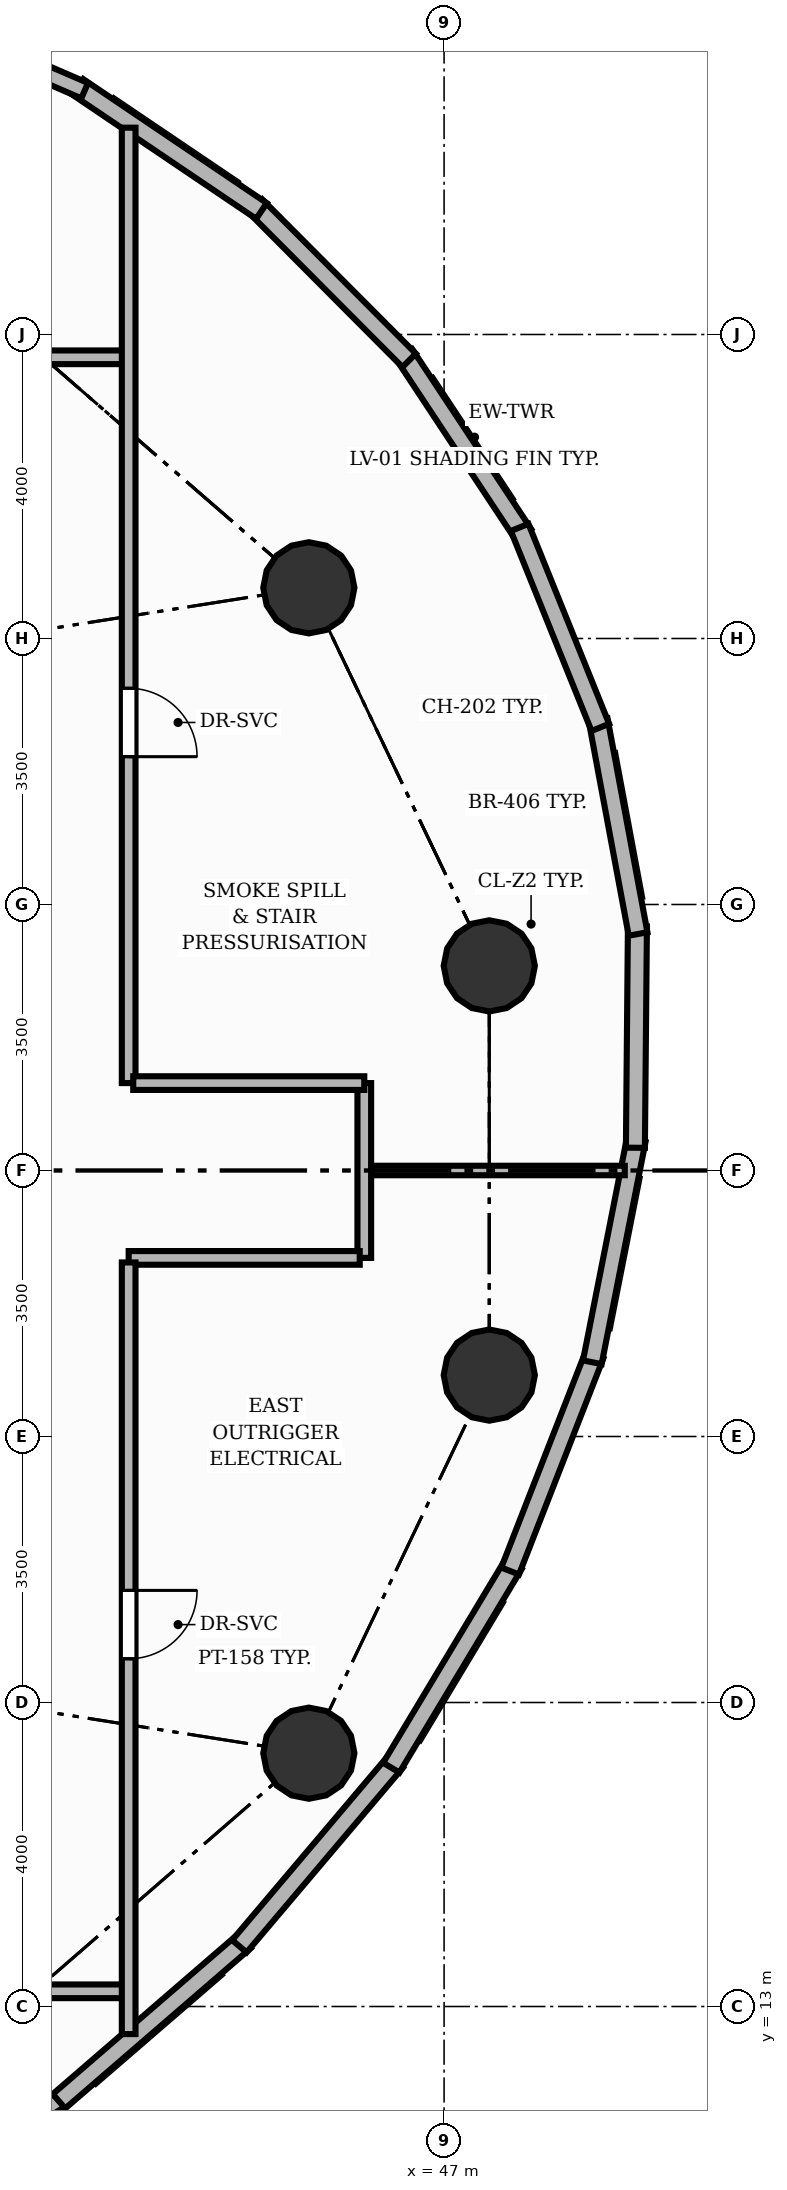
"""IFC4 building model, lengths in metres.
Left out: names, types, materials, properties, quantities, classifications, styles, units other than length and angle.
Written with IfcOpenShell. Run it as: python <this file> out.ifc"""

import sys

from ifc_helpers import new_model, si_unit, direction, frame, frame_2d, origin, origin_2d, place, context, subcontext, project, spatial, rectangle, circle, extrude, element, fill, save


model = new_model("IFC4")
c1 = context("Model", 3, precision=1e-05, world=origin(), true_north=direction((0.0, 1.0)))
c2 = subcontext(c1, "Body", "Model", "MODEL_VIEW")
j1 = project(units=[si_unit("LENGTHUNIT", "METRE"), si_unit("PLANEANGLEUNIT", "RADIAN")], contexts=[c1])
p1 = place(None, origin())
s1 = spatial("IfcSite", under=j1, at=p1, CompositionType="ELEMENT")
p2 = place(p1, origin())
s2 = spatial("IfcBuilding", under=s1, at=p2, CompositionType="ELEMENT")
p3 = place(p2, frame((0.0, 0.0, 112.48)))
s3 = spatial("IfcBuildingStorey", under=s2, at=p3, CompositionType="ELEMENT", Elevation=112.48)
for number, where, z_axis, x_axis in (
    (1, (47.594, 26.692, 0.0), (0.0, 0.0, 1.0), (1.0, 0.0, 0.0)),
    (2, (45.22, 31.667, 0.0), (0.0, 0.0, 1.0), (1.0, 0.0, 0.0)),
    (3, (45.22, 16.333, 0.0), (0.0, 0.0, 1.0), (1.0, 0.0, 0.0)),
    (4, (47.594, 21.308, 0.0), (0.0, 0.0, 1.0), (1.0, 0.0, 0.0)),
):
    element("IfcColumn", number, at=place(p3, frame(where, z_axis=z_axis, x_axis=x_axis)), inside=s3, PredefinedType="COLUMN", context=c2, shape_type="SweptSolid", body=[
        extrude(circle(Radius=0.6, at=origin_2d()), origin(), (0.0, 0.0, 1.0), 4.48),
    ])
p4 = place(p3, frame((46.476, 34.739, 0.0), z_axis=(0.0, 0.0, 1.0), x_axis=(0.551579139827, -0.83412256444, 0.0)))
e5 = element("IfcWall", 5, at=p4, inside=s3, PredefinedType="SOLIDWALL", context=c2, shape_type="SweptSolid", body=[
    extrude(rectangle(XDim=2.838, YDim=0.25, at=frame_2d((1.419, 0.0))), origin(), (0.0, 0.0, 1.0), 4.24),
])
p5 = place(p3, frame((44.52, 36.69, 0.0), z_axis=(0.0, 0.0, 1.0), x_axis=(0.705528090387, -0.708681955235, 0.0)))
e6 = element("IfcWall", 6, at=p5, inside=s3, PredefinedType="SOLIDWALL", context=c2, shape_type="SweptSolid", body=[
    extrude(rectangle(XDim=2.864, YDim=0.25, at=frame_2d((1.432, 0.0))), origin(), (0.0, 0.0, 1.0), 4.24),
])
p6 = place(p3, frame((42.183, 38.256, 0.0), z_axis=(0.0, 0.0, 1.0), x_axis=(0.828669865655, -0.559737665121, 0.0)))
e7 = element("IfcWall", 7, at=p6, inside=s3, PredefinedType="SOLIDWALL", context=c2, shape_type="SweptSolid", body=[
    extrude(rectangle(XDim=2.913, YDim=0.25, at=frame_2d((1.457, 0.0))), origin(), (0.0, 0.0, 1.0), 4.24),
])
p7 = place(p3, frame((39.537, 39.39, 0.0), z_axis=(0.0, 0.0, 1.0), x_axis=(0.917825556338, -0.396983939389, 0.0)))
e8 = element("IfcWall", 8, at=p7, inside=s3, PredefinedType="PARAPET", context=c2, shape_type="SweptSolid", body=[
    extrude(rectangle(XDim=2.978, YDim=0.22, at=frame_2d((1.489, 0.0))), origin(), (0.0, 0.0, 1.0), 1.15),
])
p8 = place(p3, frame((42.011, 11.81, 0.0), z_axis=(0.0, 0.0, 1.0), x_axis=(-0.847457608368, -0.530863072759, 0.0)))
e9 = element("IfcWall", 9, at=p8, inside=s3, PredefinedType="PARAPET", context=c2, shape_type="SweptSolid", body=[
    extrude(rectangle(XDim=3.25, YDim=0.22, at=frame_2d((1.625, 0.0))), origin(), (0.0, 0.0, 1.0), 1.15),
])
p9 = place(p3, frame((44.375, 13.862, 0.0), z_axis=(0.0, 0.0, 1.0), x_axis=(-0.756826410558, -0.653615930254, 0.0)))
e10 = element("IfcWall", 10, at=p9, inside=s3, PredefinedType="SOLIDWALL", context=c2, shape_type="SweptSolid", body=[
    extrude(rectangle(XDim=3.227, YDim=0.25, at=frame_2d((1.613, 0.0))), origin(), (0.0, 0.0, 1.0), 4.24),
])
p10 = place(p3, frame((46.362, 16.222, 0.0), z_axis=(0.0, 0.0, 1.0), x_axis=(-0.646014464781, -0.763325167471, 0.0)))
e11 = element("IfcWall", 11, at=p10, inside=s3, PredefinedType="SOLIDWALL", context=c2, shape_type="SweptSolid", body=[
    extrude(rectangle(XDim=3.182, YDim=0.25, at=frame_2d((1.591, 0.0))), origin(), (0.0, 0.0, 1.0), 4.24),
])
p11 = place(p3, frame((47.912, 18.818, 0.0), z_axis=(0.0, 0.0, 1.0), x_axis=(-0.514840799828, -0.857285804637, 0.0)))
e12 = element("IfcWall", 12, at=p11, inside=s3, PredefinedType="SOLIDWALL", context=c2, shape_type="SweptSolid", body=[
    extrude(rectangle(XDim=3.121, YDim=0.25, at=frame_2d((1.561, 0.0))), origin(), (0.0, 0.0, 1.0), 4.24),
])
p12 = place(p3, frame((48.978, 21.572, 0.0), z_axis=(0.0, 0.0, 1.0), x_axis=(-0.363554342734, -0.931572992244, 0.0)))
e13 = element("IfcWall", 13, at=p12, inside=s3, PredefinedType="SOLIDWALL", context=c2, shape_type="SweptSolid", body=[
    extrude(rectangle(XDim=3.051, YDim=0.25, at=frame_2d((1.525, 0.0))), origin(), (0.0, 0.0, 1.0), 4.24),
])
p13 = place(p3, frame((49.527, 24.399, 0.0), z_axis=(0.0, 0.0, 1.0), x_axis=(-0.193703626227, -0.981060092546, 0.0)))
e14 = element("IfcWall", 14, at=p13, inside=s3, PredefinedType="SOLIDWALL", context=c2, shape_type="SweptSolid", body=[
    extrude(rectangle(XDim=2.978, YDim=0.25, at=frame_2d((1.489, 0.0))), origin(), (0.0, 0.0, 1.0), 4.24),
])
p14 = place(p3, frame((49.544, 27.212, 0.0), z_axis=(0.0, 0.0, 1.0), x_axis=(-0.009134717755, -0.999958277595, 0.0)))
e15 = element("IfcWall", 15, at=p14, inside=s3, PredefinedType="SOLIDWALL", context=c2, shape_type="SweptSolid", body=[
    extrude(rectangle(XDim=2.913, YDim=0.25, at=frame_2d((1.457, 0.0))), origin(), (0.0, 0.0, 1.0), 4.24),
])
p15 = place(p3, frame((49.027, 29.927, 0.0), z_axis=(0.0, 0.0, 1.0), x_axis=(0.183444393849, -0.98303008823, 0.0)))
e16 = element("IfcWall", 16, at=p15, inside=s3, PredefinedType="SOLIDWALL", context=c2, shape_type="SweptSolid", body=[
    extrude(rectangle(XDim=2.864, YDim=0.25, at=frame_2d((1.432, 0.0))), origin(), (0.0, 0.0, 1.0), 4.24),
])
p16 = place(p3, frame((47.994, 32.462, 0.0), z_axis=(0.0, 0.0, 1.0), x_axis=(0.374088888102, -0.927392853002, 0.0)))
e17 = element("IfcWall", 17, at=p16, inside=s3, PredefinedType="SOLIDWALL", context=c2, shape_type="SweptSolid", body=[
    extrude(rectangle(XDim=2.838, YDim=0.25, at=frame_2d((1.419, 0.0))), origin(), (0.0, 0.0, 1.0), 4.24),
])
p17 = place(p3, frame((42.85, 13.2, 0.0), z_axis=(0.0, 0.0, 1.0), x_axis=(-1.0, 0.0, 0.0)))
e18 = element("IfcWall", 18, at=p17, inside=s3, PredefinedType="PARTITIONING", context=c2, shape_type="SweptSolid", body=[
    extrude(rectangle(XDim=21.7, YDim=0.18, at=frame_2d((10.85, 0.0))), origin(), (0.0, 0.0, 1.0), 3.691),
])
p18 = place(p17, frame((10.4, 0.0, 0.0)))
e19 = element("IfcOpeningElement", 19, at=p18, cuts=e18, PredefinedType="OPENING", context=c2, shape_type="SweptSolid", body=[
    extrude(rectangle(XDim=0.9, YDim=2.1, at=frame_2d((0.45, 1.05))), frame((0.0, 0.1, 0.0), z_axis=(0.0, -1.0, 0.0), x_axis=(1.0, 0.0, 0.0)), (0.0, 0.0, 1.0), 0.2),
])
p19 = place(p3, frame((21.15, 34.7, 0.0), z_axis=(0.0, 0.0, 1.0), x_axis=(1.0, 0.0, 0.0)))
e20 = element("IfcWall", 20, at=p19, inside=s3, PredefinedType="PARTITIONING", context=c2, shape_type="SweptSolid", body=[
    extrude(rectangle(XDim=21.7, YDim=0.18, at=frame_2d((10.85, 0.0))), origin(), (0.0, 0.0, 1.0), 3.691),
])
p20 = place(p19, frame((15.715, 0.0, 0.0)))
e21 = element("IfcOpeningElement", 21, at=p20, cuts=e20, PredefinedType="OPENING", context=c2, shape_type="SweptSolid", body=[
    extrude(rectangle(XDim=0.9, YDim=2.1, at=frame_2d((0.45, 1.05))), frame((0.0, 0.1, 0.0), z_axis=(0.0, -1.0, 0.0), x_axis=(1.0, 0.0, 0.0)), (0.0, 0.0, 1.0), 0.2),
])
p21 = place(p19, frame((8.4, 0.0, 0.0)))
e22 = element("IfcOpeningElement", 22, at=p21, cuts=e20, PredefinedType="OPENING", context=c2, shape_type="SweptSolid", body=[
    extrude(rectangle(XDim=0.9, YDim=2.1, at=frame_2d((0.45, 1.05))), frame((0.0, 0.1, 0.0), z_axis=(0.0, -1.0, 0.0), x_axis=(1.0, 0.0, 0.0)), (0.0, 0.0, 1.0), 0.2),
])
p22 = place(p19, frame((3.365, 0.0, 0.0)))
e23 = element("IfcOpeningElement", 23, at=p22, cuts=e20, PredefinedType="OPENING", context=c2, shape_type="SweptSolid", body=[
    extrude(rectangle(XDim=0.9, YDim=2.1, at=frame_2d((0.45, 1.05))), frame((0.0, 0.1, 0.0), z_axis=(0.0, -1.0, 0.0), x_axis=(1.0, 0.0, 0.0)), (0.0, 0.0, 1.0), 0.2),
])
p23 = place(p3, frame((45.95, 25.15, 0.0), z_axis=(0.0, 0.0, 1.0), x_axis=(0.0, -1.0, 0.0)))
e24 = element("IfcWall", 24, at=p23, inside=s3, PredefinedType="PARTITIONING", context=c2, shape_type="SweptSolid", body=[
    extrude(rectangle(XDim=2.3, YDim=0.18, at=frame_2d((1.15, 0.0))), origin(), (0.0, 0.0, 1.0), 3.691),
])
p24 = place(p3, frame((45.89, 22.85, 0.0), z_axis=(0.0, 0.0, 1.0), x_axis=(-1.0, 0.0, 0.0)))
e25 = element("IfcWall", 25, at=p24, inside=s3, PredefinedType="PARTITIONING", context=c2, shape_type="SweptSolid", body=[
    extrude(rectangle(XDim=3.04, YDim=0.18, at=frame_2d((1.52, 0.0))), origin(), (0.0, 0.0, 1.0), 4.235),
])
p25 = place(p3, frame((42.85, 22.79, 0.0), z_axis=(0.0, 0.0, 1.0), x_axis=(0.0, -1.0, 0.0)))
e26 = element("IfcWall", 26, at=p25, inside=s3, PredefinedType="PARTITIONING", context=c2, shape_type="SweptSolid", body=[
    extrude(rectangle(XDim=10.153, YDim=0.18, at=frame_2d((5.076, 0.0))), origin(), (0.0, 0.0, 1.0), 4.235),
])
p26 = place(p25, frame((4.315, 0.0, 0.0)))
e27 = element("IfcOpeningElement", 27, at=p26, cuts=e26, PredefinedType="OPENING", context=c2, shape_type="SweptSolid", body=[
    extrude(rectangle(XDim=0.9, YDim=2.1, at=frame_2d((0.45, 1.05))), frame((0.0, 0.1, 0.0), z_axis=(0.0, -1.0, 0.0), x_axis=(1.0, 0.0, 0.0)), (0.0, 0.0, 1.0), 0.2),
])
p27 = place(p3, frame((42.85, 37.721, 0.0), z_axis=(0.0, 0.0, 1.0), x_axis=(0.0, -1.0, 0.0)))
e28 = element("IfcWall", 28, at=p27, inside=s3, PredefinedType="PARTITIONING", context=c2, shape_type="SweptSolid", body=[
    extrude(rectangle(XDim=12.571, YDim=0.18, at=frame_2d((6.286, 0.0))), origin(), (0.0, 0.0, 1.0), 4.235),
])
p28 = place(p27, frame((7.376, 0.0, 0.0)))
e29 = element("IfcOpeningElement", 29, at=p28, cuts=e28, PredefinedType="OPENING", context=c2, shape_type="SweptSolid", body=[
    extrude(rectangle(XDim=0.9, YDim=2.1, at=frame_2d((0.45, 1.05))), frame((0.0, 0.1, 0.0), z_axis=(0.0, -1.0, 0.0), x_axis=(1.0, 0.0, 0.0)), (0.0, 0.0, 1.0), 0.2),
])
p29 = place(p3, frame((42.91, 25.15, 0.0), z_axis=(0.0, 0.0, 1.0), x_axis=(1.0, 0.0, 0.0)))
e30 = element("IfcWall", 30, at=p29, inside=s3, PredefinedType="PARTITIONING", context=c2, shape_type="SweptSolid", body=[
    extrude(rectangle(XDim=3.04, YDim=0.18, at=frame_2d((1.52, 0.0))), origin(), (0.0, 0.0, 1.0), 4.235),
])
p30 = place(p3, frame((46.05, 24.0, 0.0), z_axis=(0.0, 0.0, 1.0), x_axis=(1.0, 0.0, 0.0)))
e31 = element("IfcWall", 31, at=p30, inside=s3, PredefinedType="PARTITIONING", context=c2, shape_type="SweptSolid", body=[
    extrude(rectangle(XDim=3.327, YDim=0.125, at=frame_2d((1.664, 0.0))), origin(), (0.0, 0.0, 1.0), 4.235),
])
p31 = place(p26, origin())
e32 = element("IfcDoor", 32, at=p31, inside=s3, OperationType="SINGLE_SWING_LEFT", PredefinedType="DOOR", context=c2, shape_type="SweptSolid", body=[
    extrude(rectangle(XDim=0.9, YDim=2.1, at=frame_2d((0.45, 1.05))), frame((0.0, 0.025, 0.0), z_axis=(0.0, -1.0, 0.0), x_axis=(1.0, 0.0, 0.0)), (0.0, 0.0, 1.0), 0.05),
])
fill(e27, e32)
p32 = place(p28, origin())
e33 = element("IfcDoor", 33, at=p32, inside=s3, OperationType="SINGLE_SWING_RIGHT", PredefinedType="DOOR", context=c2, shape_type="SweptSolid", body=[
    extrude(rectangle(XDim=0.9, YDim=2.1, at=frame_2d((0.45, 1.05))), frame((0.0, 0.025, 0.0), z_axis=(0.0, -1.0, 0.0), x_axis=(1.0, 0.0, 0.0)), (0.0, 0.0, 1.0), 0.05),
])
fill(e29, e33)
save(model, sys.argv[1])
